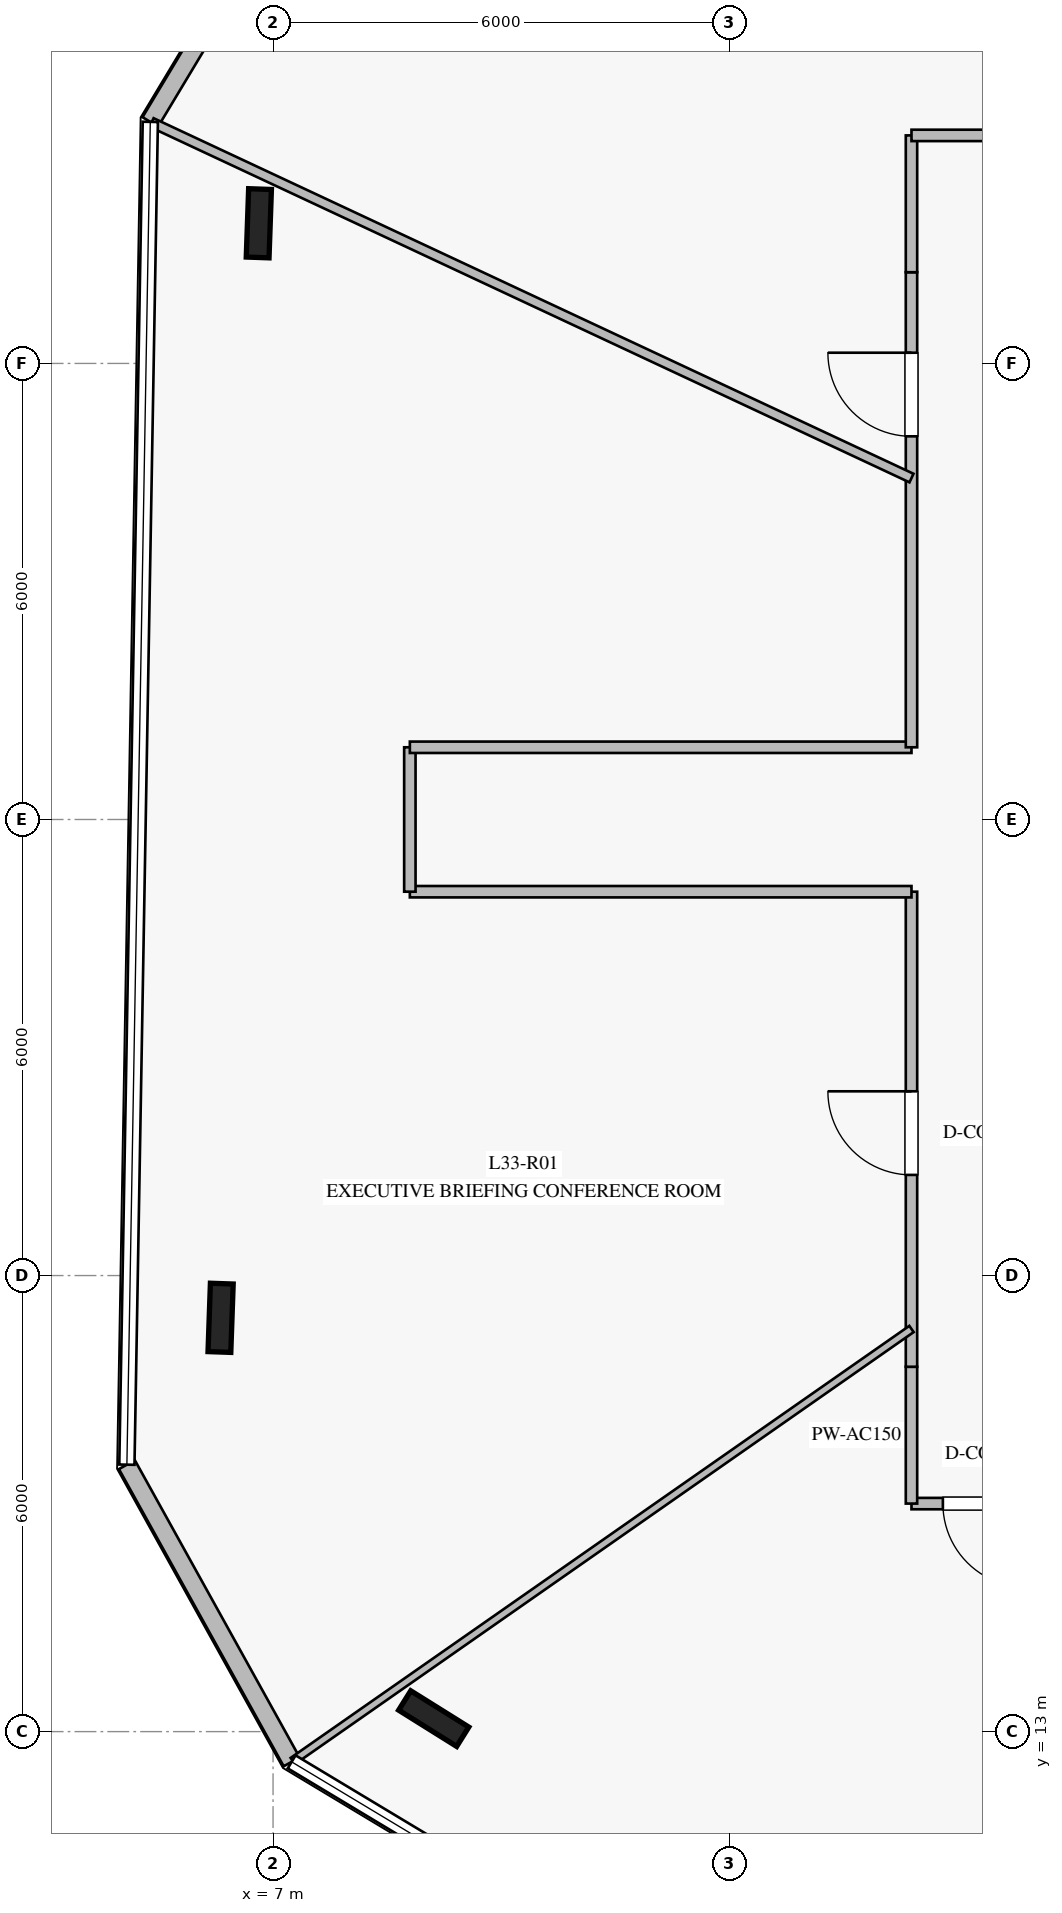
"""IFC4 building model, lengths in metres.
Left out: names, types, materials, properties, quantities, classifications, styles, units other than length and angle.
Written with IfcOpenShell. Run it as: python <this file> out.ifc"""

import sys

from ifc_helpers import new_model, si_unit, direction, frame, frame_2d, origin, origin_2d, place, context, subcontext, project, spatial, rectangle, i_section, extrude, element, fill, save


model = new_model("IFC4")
c1 = context("Model", 3, precision=1e-05, world=origin(), true_north=direction((0.0, 1.0)))
c2 = subcontext(c1, "Body", "Model", "MODEL_VIEW")
j1 = project(units=[si_unit("LENGTHUNIT", "METRE"), si_unit("PLANEANGLEUNIT", "RADIAN")], contexts=[c1])
p1 = place(None, origin())
s1 = spatial("IfcSite", under=j1, at=p1, CompositionType="ELEMENT")
p2 = place(p1, origin())
s2 = spatial("IfcBuilding", under=s1, at=p2, CompositionType="ELEMENT")
p3 = place(p2, frame((0.0, 0.0, 138.4)))
s3 = spatial("IfcBuildingStorey", under=s2, at=p3, CompositionType="ELEMENT", Elevation=138.4)
for number, where, z_axis, x_axis in (
    (1, (6.813, 32.844, 0.0), (0.0, 0.0, 1.0), (0.035, 0.999, 0.0)),
    (2, (6.31, 18.444, 0.0), (0.0, 0.0, 1.0), (0.035, 0.999, 0.0)),
    (3, (9.114, 13.171, 0.0), (0.0, 0.0, 1.0), (-0.848, 0.53, 0.0)),
):
    element("IfcColumn", number, at=place(p3, frame(where, z_axis=z_axis, x_axis=x_axis)), inside=s3, PredefinedType="COLUMN", context=c2, shape_type="SweptSolid", body=[
        extrude(i_section(OverallWidth=0.3, OverallDepth=0.9, WebThickness=0.019, FlangeThickness=0.035, at=origin_2d()), origin(), (0.0, 0.0, 1.0), 4.0),
    ])
p4 = place(p3, frame((7.688, 38.01, 0.0), z_axis=(0.0, 0.0, 1.0), x_axis=(-0.515113973, -0.857121691955, 0.0)))
e4 = element("IfcWall", 4, at=p4, inside=s3, PredefinedType="STANDARD", context=c2, shape_type="SweptSolid", body=[
    extrude(rectangle(XDim=4.471, YDim=0.24, at=frame_2d((2.235, 0.0))), origin(), (0.0, 0.0, 1.0), 3.76),
])
p5 = place(p3, frame((5.077, 16.512, 0.0), z_axis=(0.0, 0.0, 1.0), x_axis=(0.484965863304, -0.874533081953, 0.0)))
e5 = element("IfcWall", 5, at=p5, inside=s3, PredefinedType="STANDARD", context=c2, shape_type="SweptSolid", body=[
    extrude(rectangle(XDim=4.471, YDim=0.24, at=frame_2d((2.235, 0.0))), origin(), (0.0, 0.0, 1.0), 3.76),
])
p6 = place(p3, frame((17.2, 16.0, 0.0), z_axis=(0.0, 0.0, 1.0), x_axis=(-1.0, 0.0, 0.0)))
e6 = element("IfcWall", 6, at=p6, inside=s3, PredefinedType="PARTITIONING", context=c2, shape_type="SweptSolid", body=[
    extrude(rectangle(XDim=1.8, YDim=0.15, at=frame_2d((0.9, 0.0))), origin(), (0.0, 0.0, 1.0), 3.36),
])
p7 = place(p6, frame((0.287, 0.0, 0.0)))
e7 = element("IfcOpeningElement", 7, at=p7, cuts=e6, PredefinedType="OPENING", context=c2, shape_type="SweptSolid", body=[
    extrude(rectangle(XDim=1.1, YDim=2.2, at=frame_2d((0.55, 1.1))), frame((0.0, 0.085, 0.0), z_axis=(0.0, -1.0, 0.0), x_axis=(1.0, 0.0, 0.0)), (0.0, 0.0, 1.0), 0.17),
])
p8 = place(p3, frame((15.4, 16.0, 0.0), z_axis=(0.0, 0.0, 1.0), x_axis=(0.0, 1.0, 0.0)))
e8 = element("IfcWall", 8, at=p8, inside=s3, PredefinedType="PARTITIONING", context=c2, shape_type="SweptSolid", body=[
    extrude(rectangle(XDim=1.8, YDim=0.15, at=frame_2d((0.9, 0.0))), origin(), (0.0, 0.0, 1.0), 3.21),
])
p9 = place(p3, frame((15.4, 17.8, 0.0), z_axis=(0.0, 0.0, 1.0), x_axis=(0.0, 1.0, 0.0)))
e9 = element("IfcWall", 9, at=p9, inside=s3, PredefinedType="PARTITIONING", context=c2, shape_type="SweptSolid", body=[
    extrude(rectangle(XDim=6.25, YDim=0.15, at=frame_2d((3.125, 0.0))), origin(), (0.0, 0.0, 1.0), 3.21),
])
p10 = place(p9, frame((2.524, 0.0, 0.0)))
e10 = element("IfcOpeningElement", 10, at=p10, cuts=e9, PredefinedType="OPENING", context=c2, shape_type="SweptSolid", body=[
    extrude(rectangle(XDim=1.1, YDim=2.2, at=frame_2d((0.55, 1.1))), frame((0.0, 0.085, 0.0), z_axis=(0.0, -1.0, 0.0), x_axis=(1.0, 0.0, 0.0)), (0.0, 0.0, 1.0), 0.17),
])
p11 = place(p3, frame((15.4, 24.05, 0.0), z_axis=(0.0, 0.0, 1.0), x_axis=(-1.0, 0.0, 0.0)))
e11 = element("IfcWall", 11, at=p11, inside=s3, PredefinedType="PARTITIONING", context=c2, shape_type="SweptSolid", body=[
    extrude(rectangle(XDim=6.6, YDim=0.15, at=frame_2d((3.3, 0.0))), origin(), (0.0, 0.0, 1.0), 3.36),
])
p12 = place(p3, frame((8.8, 24.05, 0.0), z_axis=(0.0, 0.0, 1.0), x_axis=(0.0, 1.0, 0.0)))
e12 = element("IfcWall", 12, at=p12, inside=s3, PredefinedType="PARTITIONING", context=c2, shape_type="SweptSolid", body=[
    extrude(rectangle(XDim=1.9, YDim=0.15, at=frame_2d((0.95, 0.0))), origin(), (0.0, 0.0, 1.0), 3.76),
])
p13 = place(p3, frame((8.8, 25.95, 0.0), z_axis=(0.0, 0.0, 1.0), x_axis=(1.0, 0.0, 0.0)))
e13 = element("IfcWall", 13, at=p13, inside=s3, PredefinedType="PARTITIONING", context=c2, shape_type="SweptSolid", body=[
    extrude(rectangle(XDim=6.6, YDim=0.15, at=frame_2d((3.3, 0.0))), origin(), (0.0, 0.0, 1.0), 3.36),
])
p14 = place(p3, frame((15.4, 25.95, 0.0), z_axis=(0.0, 0.0, 1.0), x_axis=(0.0, 1.0, 0.0)))
e14 = element("IfcWall", 14, at=p14, inside=s3, PredefinedType="PARTITIONING", context=c2, shape_type="SweptSolid", body=[
    extrude(rectangle(XDim=6.25, YDim=0.15, at=frame_2d((3.125, 0.0))), origin(), (0.0, 0.0, 1.0), 3.21),
])
p15 = place(p14, frame((4.091, 0.0, 0.0)))
e15 = element("IfcOpeningElement", 15, at=p15, cuts=e14, PredefinedType="OPENING", context=c2, shape_type="SweptSolid", body=[
    extrude(rectangle(XDim=1.1, YDim=2.2, at=frame_2d((0.55, 1.1))), frame((0.0, 0.085, 0.0), z_axis=(0.0, -1.0, 0.0), x_axis=(1.0, 0.0, 0.0)), (0.0, 0.0, 1.0), 0.17),
])
p16 = place(p3, frame((15.4, 32.2, 0.0), z_axis=(0.0, 0.0, 1.0), x_axis=(0.0, 1.0, 0.0)))
e16 = element("IfcWall", 16, at=p16, inside=s3, PredefinedType="PARTITIONING", context=c2, shape_type="SweptSolid", body=[
    extrude(rectangle(XDim=1.8, YDim=0.15, at=frame_2d((0.9, 0.0))), origin(), (0.0, 0.0, 1.0), 3.21),
])
p17 = place(p3, frame((15.4, 34.0, 0.0), z_axis=(0.0, 0.0, 1.0), x_axis=(1.0, 0.0, 0.0)))
e17 = element("IfcWall", 17, at=p17, inside=s3, PredefinedType="PARTITIONING", context=c2, shape_type="SweptSolid", body=[
    extrude(rectangle(XDim=1.8, YDim=0.15, at=frame_2d((0.9, 0.0))), origin(), (0.0, 0.0, 1.0), 3.76),
])
p18 = place(p3, frame((15.4, 29.492, 0.0), z_axis=(0.0, 0.0, 1.0), x_axis=(-0.905754360865, 0.423803064847, 0.0)))
e18 = element("IfcWall", 18, at=p18, inside=s3, PredefinedType="PARTITIONING", context=c2, shape_type="SweptSolid", body=[
    extrude(rectangle(XDim=11.038, YDim=0.125, at=frame_2d((5.519, 0.0))), origin(), (0.0, 0.0, 1.0), 3.16),
])
p19 = place(p3, frame((15.4, 18.297, 0.0), z_axis=(0.0, 0.0, 1.0), x_axis=(-0.819886429215, -0.572526194325, 0.0)))
e19 = element("IfcWall", 19, at=p19, inside=s3, PredefinedType="MOVABLE", context=c2, shape_type="SweptSolid", body=[
    extrude(rectangle(XDim=9.928, YDim=0.1, at=frame_2d((4.964, 0.0))), origin(), (0.0, 0.0, 1.0), 3.16),
])
p20 = place(p10, origin())
e20 = element("IfcDoor", 20, at=p20, inside=s3, OperationType="SINGLE_SWING_RIGHT", PredefinedType="DOOR", context=c2, shape_type="SweptSolid", body=[
    extrude(rectangle(XDim=1.1, YDim=2.2, at=frame_2d((0.55, 1.1))), frame((0.0, 0.025, 0.0), z_axis=(0.0, -1.0, 0.0), x_axis=(1.0, 0.0, 0.0)), (0.0, 0.0, 1.0), 0.05),
])
fill(e10, e20)
p21 = place(p7, origin())
e21 = element("IfcDoor", 21, at=p21, inside=s3, OperationType="SINGLE_SWING_LEFT", PredefinedType="DOOR", context=c2, shape_type="SweptSolid", body=[
    extrude(rectangle(XDim=1.1, YDim=2.2, at=frame_2d((0.55, 1.1))), frame((0.0, 0.025, 0.0), z_axis=(0.0, -1.0, 0.0), x_axis=(1.0, 0.0, 0.0)), (0.0, 0.0, 1.0), 0.05),
])
fill(e7, e21)
p22 = place(p15, origin())
e22 = element("IfcDoor", 22, at=p22, inside=s3, OperationType="SINGLE_SWING_RIGHT", PredefinedType="DOOR", context=c2, shape_type="SweptSolid", body=[
    extrude(rectangle(XDim=1.1, YDim=2.2, at=frame_2d((0.55, 1.1))), frame((0.0, 0.025, 0.0), z_axis=(0.0, -1.0, 0.0), x_axis=(1.0, 0.0, 0.0)), (0.0, 0.0, 1.0), 0.05),
])
fill(e15, e22)
save(model, sys.argv[1])
